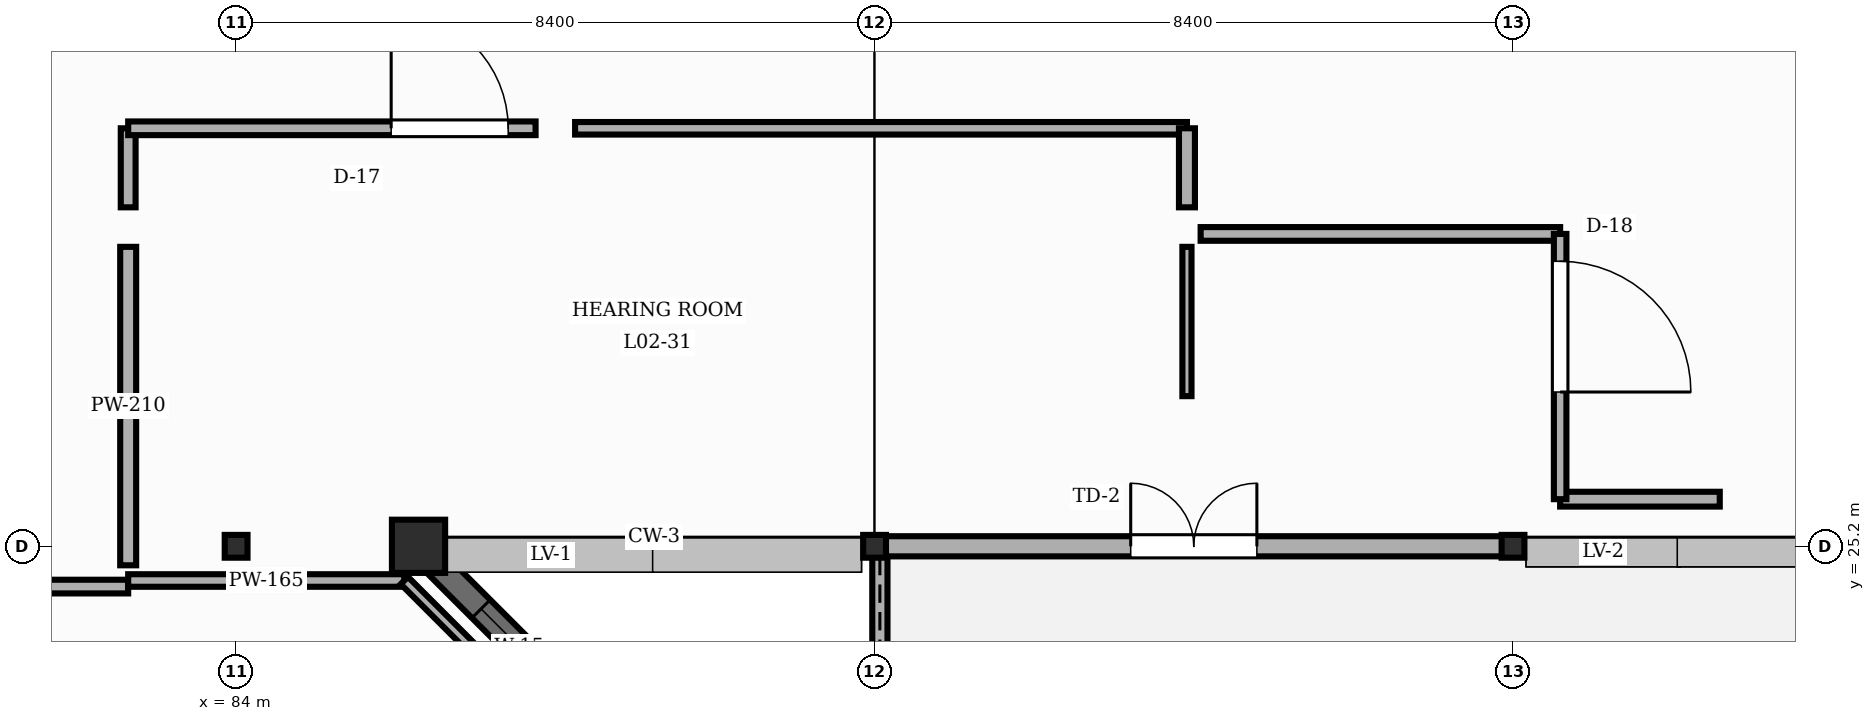
"""IFC4 building model, lengths in metres.
Left out: names, types, materials, properties, quantities, classifications, styles, units other than length and angle.
Written with IfcOpenShell. Run it as: python <this file> out.ifc"""

import sys

from ifc_helpers import new_model, si_unit, direction, frame, frame_2d, origin, origin_2d, place, context, subcontext, project, spatial, rectangle, i_section, extrude, element, fill, save


model = new_model("IFC4")
c1 = context("Model", 3, precision=1e-05, world=origin(), true_north=direction((0.0, 1.0)))
c2 = subcontext(c1, "Body", "Model", "MODEL_VIEW")
j1 = project(units=[si_unit("LENGTHUNIT", "METRE"), si_unit("PLANEANGLEUNIT", "RADIAN")], contexts=[c1])
p1 = place(None, origin())
s1 = spatial("IfcSite", under=j1, at=p1, CompositionType="ELEMENT")
p2 = place(p1, origin())
s2 = spatial("IfcBuilding", under=s1, at=p2, CompositionType="ELEMENT")
p3 = place(p2, frame((0.0, 0.0, 9.9)))
s3 = spatial("IfcBuildingStorey", under=s2, at=p3, CompositionType="ELEMENT", Elevation=9.9)
for number, where, z_axis, x_axis in (
    (1, (84.0, 25.2, 0.0), (0.0, 0.0, 1.0), (1.0, 0.0, 0.0)),
    (2, (92.4, 25.2, 0.0), (0.0, 0.0, 1.0), (1.0, 0.0, 0.0)),
    (3, (100.8, 25.2, 0.0), (0.0, 0.0, 1.0), (1.0, 0.0, 0.0)),
):
    element("IfcColumn", number, at=place(p3, frame(where, z_axis=z_axis, x_axis=x_axis)), inside=s3, PredefinedType="COLUMN", context=c2, shape_type="SweptSolid", body=[
        extrude(i_section(OverallWidth=0.3, OverallDepth=0.3, WebThickness=0.011, FlangeThickness=0.019, FilletRadius=0.027, at=origin_2d()), origin(), (0.0, 0.0, 1.0), 4.05),
    ])
p4 = place(p3, frame((86.4, 25.2, 0.0), z_axis=(0.0, 0.0, 1.0), x_axis=(1.0, 0.0, 0.0)))
e4 = element("IfcColumn", 4, at=p4, inside=s3, PredefinedType="COLUMN", context=c2, shape_type="SweptSolid", body=[
    extrude(rectangle(XDim=0.7, YDim=0.7, at=origin_2d()), origin(), (0.0, 0.0, 1.0), 4.05),
])
p5 = place(p3, frame((92.178, 19.422, 0.0), z_axis=(0.0, 0.0, 1.0), x_axis=(-0.707106781187, 0.707106781187, 0.0)))
e5 = element("IfcWall", 5, at=p5, inside=s3, PredefinedType="SHEAR", context=c2, shape_type="SweptSolid", body=[
    extrude(rectangle(XDim=7.857, YDim=0.34, at=frame_2d((3.929, 0.0))), origin(), (0.0, 0.0, 1.0), 3.132),
])
p6 = place(p5, frame((0.85, 0.0, 1.3)))
e6 = element("IfcOpeningElement", 6, at=p6, cuts=e5, PredefinedType="OPENING", context=c2, shape_type="SweptSolid", body=[
    extrude(rectangle(XDim=1.32, YDim=1.25, at=frame_2d((0.66, 0.625))), frame((0.0, 0.18, 0.0), z_axis=(0.0, -1.0, 0.0), x_axis=(1.0, 0.0, 0.0)), (0.0, 0.0, 1.0), 0.36),
])
p7 = place(p5, frame((5.587, 0.0, 1.3)))
e7 = element("IfcOpeningElement", 7, at=p7, cuts=e5, PredefinedType="OPENING", context=c2, shape_type="SweptSolid", body=[
    extrude(rectangle(XDim=1.42, YDim=1.25, at=frame_2d((0.71, 0.625))), frame((0.0, 0.18, 0.0), z_axis=(0.0, -1.0, 0.0), x_axis=(1.0, 0.0, 0.0)), (0.0, 0.0, 1.0), 0.36),
])
p8 = place(p3, frame((92.408, 25.2, 0.0), z_axis=(0.0, 0.0, 1.0), x_axis=(1.0, 0.0, 0.0)))
e8 = element("IfcWall", 8, at=p8, inside=s3, PredefinedType="STANDARD", context=c2, shape_type="SweptSolid", body=[
    extrude(rectangle(XDim=8.384, YDim=0.265, at=frame_2d((4.192, 0.0))), origin(), (0.0, 0.0, 1.0), 3.472),
])
p9 = place(p8, frame((3.362, 0.0, 0.0)))
e9 = element("IfcOpeningElement", 9, at=p9, cuts=e8, PredefinedType="OPENING", context=c2, shape_type="SweptSolid", body=[
    extrude(rectangle(XDim=1.66, YDim=2.22, at=frame_2d((0.83, 1.11))), frame((0.0, 0.142, 0.0), z_axis=(0.0, -1.0, 0.0), x_axis=(1.0, 0.0, 0.0)), (0.0, 0.0, 1.0), 0.285),
])
p10 = place(p3, frame((92.47, 25.06, 0.0), z_axis=(0.0, 0.0, 1.0), x_axis=(0.0, -1.0, 0.0)))
e10 = element("IfcWall", 10, at=p10, inside=s3, PredefinedType="PARAPET", context=c2, shape_type="SweptSolid", body=[
    extrude(rectangle(XDim=5.0, YDim=0.2, at=frame_2d((2.5, 0.0))), origin(), (0.0, 0.0, 1.0), 0.22),
])
p11 = place(p3, frame((79.42, 24.67, -0.004), z_axis=(0.0, 0.0, 1.0), x_axis=(1.0, 0.0, 0.0)))
e11 = element("IfcWall", 11, at=p11, inside=s3, PredefinedType="STANDARD", context=c2, shape_type="SweptSolid", body=[
    extrude(rectangle(XDim=3.16, YDim=0.18, at=frame_2d((1.58, 0.0))), origin(), (0.0, 0.0, 1.0), 3.136),
])
p12 = place(p11, frame((0.36, 0.0, 0.0)))
e12 = element("IfcOpeningElement", 12, at=p12, cuts=e11, PredefinedType="OPENING", context=c2, shape_type="SweptSolid", body=[
    extrude(rectangle(XDim=1.18, YDim=2.22, at=frame_2d((0.59, 1.11))), frame((0.0, 0.1, 0.0), z_axis=(0.0, -1.0, 0.0), x_axis=(1.0, 0.0, 0.0)), (0.0, 0.0, 1.0), 0.2),
])
p13 = place(p3, frame((82.58, 24.75, -0.004), z_axis=(0.0, 0.0, 1.0), x_axis=(1.0, 0.0, 0.0)))
e13 = element("IfcWall", 13, at=p13, inside=s3, PredefinedType="STANDARD", context=c2, shape_type="SweptSolid", body=[
    extrude(rectangle(XDim=3.634, YDim=0.165, at=frame_2d((1.817, 0.0))), origin(), (0.0, 0.0, 1.0), 3.136),
])
p14 = place(p3, frame((86.214, 24.75, -0.004), z_axis=(0.0, 0.0, 1.0), x_axis=(0.707106781187, -0.707106781187, 0.0)))
e14 = element("IfcWall", 14, at=p14, inside=s3, PredefinedType="STANDARD", context=c2, shape_type="SweptSolid", body=[
    extrude(rectangle(XDim=8.112, YDim=0.135, at=frame_2d((4.056, 0.0))), origin(), (0.0, 0.0, 1.0), 3.136),
])
p15 = place(p3, frame((96.51, 29.14, -0.004), z_axis=(0.0, 0.0, 1.0), x_axis=(0.0, -1.0, 0.0)))
e15 = element("IfcWall", 15, at=p15, inside=s3, PredefinedType="STANDARD", context=c2, shape_type="SweptSolid", body=[
    extrude(rectangle(XDim=1.964, YDim=0.12, at=frame_2d((0.982, 0.0))), origin(), (0.0, 0.0, 1.0), 3.844),
])
p16 = place(p3, frame((82.58, 24.95, -0.004), z_axis=(0.0, 0.0, 1.0), x_axis=(0.0, 1.0, 0.0)))
e16 = element("IfcWall", 16, at=p16, inside=s3, PredefinedType="STANDARD", context=c2, shape_type="SweptSolid", body=[
    extrude(rectangle(XDim=4.19, YDim=0.21, at=frame_2d((2.095, 0.0))), origin(), (0.0, 0.0, 1.0), 3.844),
])
p17 = place(p3, frame((82.58, 29.66, -0.004), z_axis=(0.0, 0.0, 1.0), x_axis=(0.0, 1.0, 0.0)))
e17 = element("IfcWall", 17, at=p17, inside=s3, PredefinedType="STANDARD", context=c2, shape_type="SweptSolid", body=[
    extrude(rectangle(XDim=1.04, YDim=0.195, at=frame_2d((0.52, 0.0))), origin(), (0.0, 0.0, 1.0), 3.844),
])
p18 = place(p3, frame((82.58, 30.7, -0.004), z_axis=(0.0, 0.0, 1.0), x_axis=(1.0, 0.0, 0.0)))
e18 = element("IfcWall", 18, at=p18, inside=s3, PredefinedType="STANDARD", context=c2, shape_type="SweptSolid", body=[
    extrude(rectangle(XDim=5.36, YDim=0.18, at=frame_2d((2.68, 0.0))), origin(), (0.0, 0.0, 1.0), 3.566),
])
p19 = place(p18, frame((3.46, 0.0, 0.0)))
e19 = element("IfcOpeningElement", 19, at=p19, cuts=e18, PredefinedType="OPENING", context=c2, shape_type="SweptSolid", body=[
    extrude(rectangle(XDim=1.54, YDim=2.14, at=frame_2d((0.77, 1.07))), frame((0.0, 0.1, 0.0), z_axis=(0.0, -1.0, 0.0), x_axis=(1.0, 0.0, 0.0)), (0.0, 0.0, 1.0), 0.2),
])
p20 = place(p3, frame((88.46, 30.7, -0.004), z_axis=(0.0, 0.0, 1.0), x_axis=(1.0, 0.0, 0.0)))
e20 = element("IfcWall", 20, at=p20, inside=s3, PredefinedType="STANDARD", context=c2, shape_type="SweptSolid", body=[
    extrude(rectangle(XDim=8.05, YDim=0.165, at=frame_2d((4.025, 0.0))), origin(), (0.0, 0.0, 1.0), 3.566),
])
p21 = place(p3, frame((96.51, 30.7, -0.004), z_axis=(0.0, 0.0, 1.0), x_axis=(0.0, -1.0, 0.0)))
e21 = element("IfcWall", 21, at=p21, inside=s3, PredefinedType="STANDARD", context=c2, shape_type="SweptSolid", body=[
    extrude(rectangle(XDim=1.04, YDim=0.21, at=frame_2d((0.52, 0.0))), origin(), (0.0, 0.0, 1.0), 3.844),
])
p22 = place(p3, frame((101.42, 25.82, -0.004), z_axis=(0.0, 0.0, 1.0), x_axis=(1.0, 0.0, 0.0)))
e22 = element("IfcWall", 22, at=p22, inside=s3, PredefinedType="STANDARD", context=c2, shape_type="SweptSolid", body=[
    extrude(rectangle(XDim=2.1, YDim=0.195, at=frame_2d((1.05, 0.0))), origin(), (0.0, 0.0, 1.0), 3.844),
])
p23 = place(p3, frame((96.69, 29.31, -0.004), z_axis=(0.0, 0.0, 1.0), x_axis=(1.0, 0.0, 0.0)))
e23 = element("IfcWall", 23, at=p23, inside=s3, PredefinedType="STANDARD", context=c2, shape_type="SweptSolid", body=[
    extrude(rectangle(XDim=4.73, YDim=0.18, at=frame_2d((2.365, 0.0))), origin(), (0.0, 0.0, 1.0), 3.844),
])
p24 = place(p3, frame((101.42, 29.31, -0.004), z_axis=(0.0, 0.0, 1.0), x_axis=(0.0, -1.0, 0.0)))
e24 = element("IfcWall", 24, at=p24, inside=s3, PredefinedType="STANDARD", context=c2, shape_type="SweptSolid", body=[
    extrude(rectangle(XDim=3.49, YDim=0.165, at=frame_2d((1.745, 0.0))), origin(), (0.0, 0.0, 1.0), 3.844),
])
p25 = place(p24, frame((0.36, 0.0, 0.0)))
e25 = element("IfcOpeningElement", 25, at=p25, cuts=e24, PredefinedType="OPENING", context=c2, shape_type="SweptSolid", body=[
    extrude(rectangle(XDim=1.72, YDim=2.14, at=frame_2d((0.86, 1.07))), frame((0.0, 0.093, 0.0), z_axis=(0.0, -1.0, 0.0), x_axis=(1.0, 0.0, 0.0)), (0.0, 0.0, 1.0), 0.185),
])
p26 = place(p7, origin())
e26 = element("IfcWindow", 26, at=p26, inside=s3, PartitioningType="SINGLE_PANEL", PredefinedType="WINDOW", context=c2, shape_type="SweptSolid", body=[
    extrude(rectangle(XDim=1.42, YDim=1.25, at=frame_2d((0.71, 0.625))), frame((0.0, 0.03, 0.0), z_axis=(0.0, -1.0, 0.0), x_axis=(1.0, 0.0, 0.0)), (0.0, 0.0, 1.0), 0.06),
])
fill(e7, e26)
p27 = place(p9, origin())
e27 = element("IfcDoor", 27, at=p27, inside=s3, OperationType="DOUBLE_DOOR_SINGLE_SWING", PredefinedType="DOOR", context=c2, shape_type="SweptSolid", body=[
    extrude(rectangle(XDim=1.66, YDim=2.22, at=frame_2d((0.83, 1.11))), frame((0.0, 0.025, 0.0), z_axis=(0.0, -1.0, 0.0), x_axis=(1.0, 0.0, 0.0)), (0.0, 0.0, 1.0), 0.05),
])
fill(e9, e27)
p28 = place(p19, origin())
e28 = element("IfcDoor", 28, at=p28, inside=s3, OperationType="SINGLE_SWING_LEFT", PredefinedType="DOOR", context=c2, shape_type="SweptSolid", body=[
    extrude(rectangle(XDim=1.54, YDim=2.14, at=frame_2d((0.77, 1.07))), frame((0.0, 0.025, 0.0), z_axis=(0.0, -1.0, 0.0), x_axis=(1.0, 0.0, 0.0)), (0.0, 0.0, 1.0), 0.05),
])
fill(e19, e28)
p29 = place(p25, origin())
e29 = element("IfcDoor", 29, at=p29, inside=s3, OperationType="SINGLE_SWING_RIGHT", PredefinedType="DOOR", context=c2, shape_type="SweptSolid", body=[
    extrude(rectangle(XDim=1.72, YDim=2.14, at=frame_2d((0.86, 1.07))), frame((0.0, 0.025, 0.0), z_axis=(0.0, -1.0, 0.0), x_axis=(1.0, 0.0, 0.0)), (0.0, 0.0, 1.0), 0.05),
])
fill(e25, e29)
save(model, sys.argv[1])
